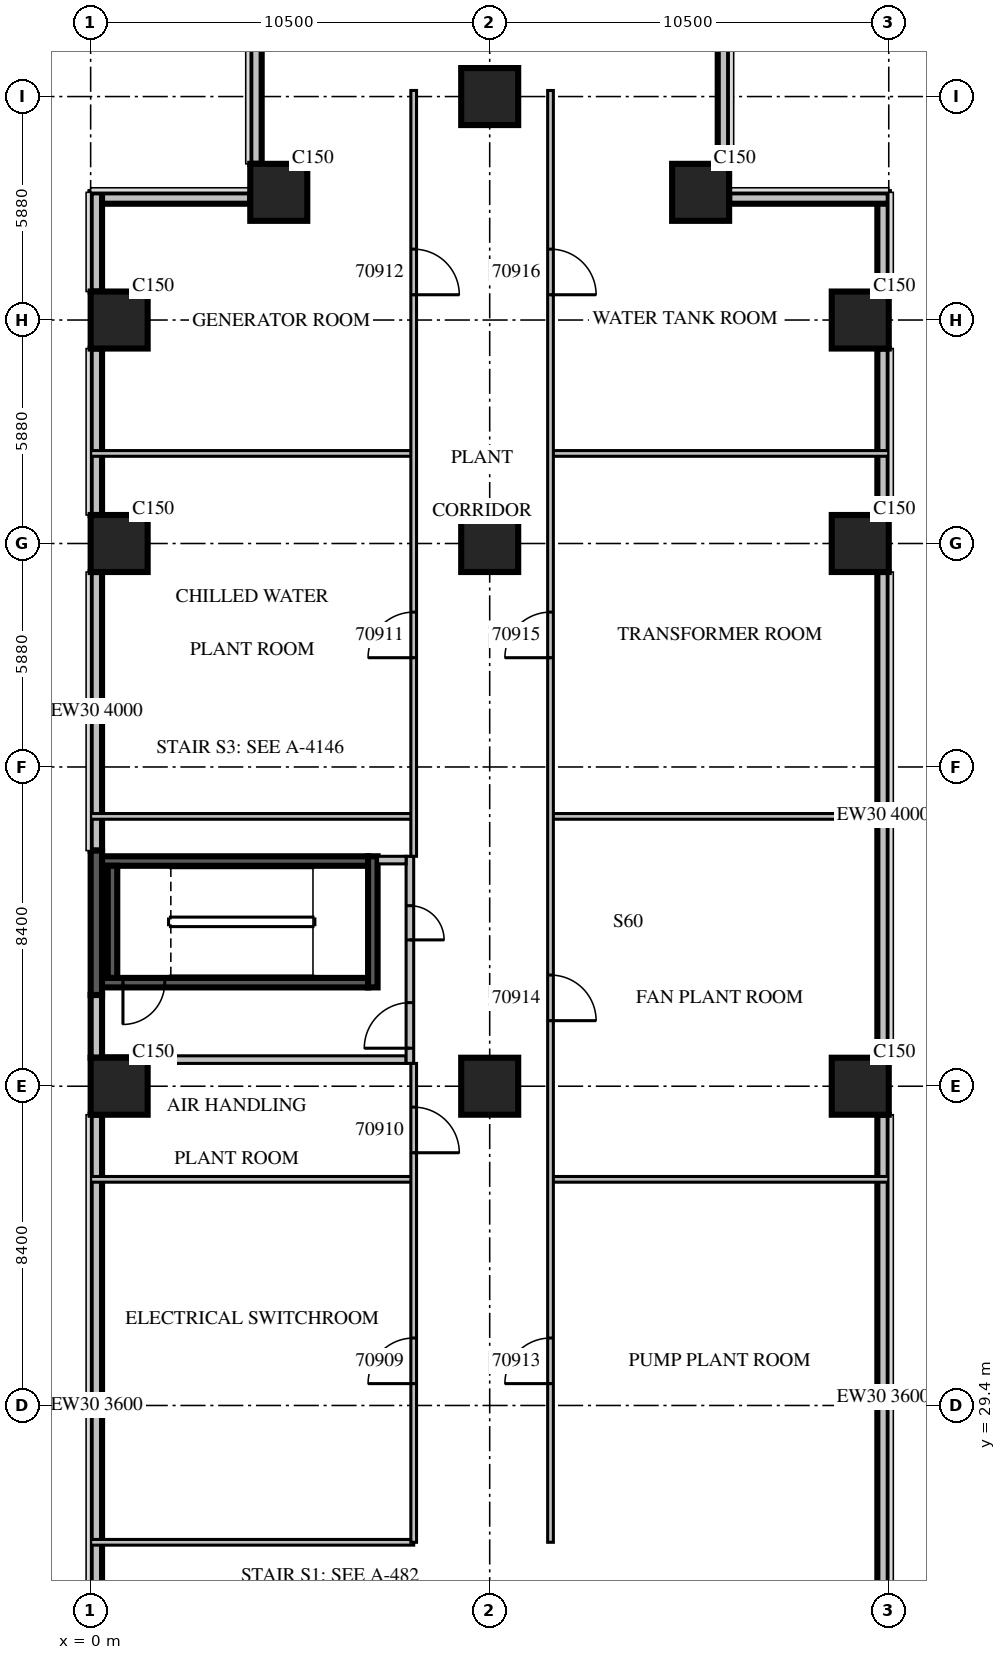
"""IFC4 building model, lengths in metres.
Left out: names, types, materials, properties, quantities, classifications, styles, units other than length and angle.
Written with IfcOpenShell. Run it as: python <this file> out.ifc"""

import sys

from ifc_helpers import new_model, si_unit, direction, frame, frame_2d, origin, origin_2d, place, context, subcontext, project, spatial, rectangle, extrude, source, transform, mapped, element, fill, save


model = new_model("IFC4")
c1 = context("Model", 3, precision=1e-05, world=origin(), true_north=direction((0.0, 1.0)))
c2 = subcontext(c1, "Body", "Model", "MODEL_VIEW")
j1 = project(units=[si_unit("LENGTHUNIT", "METRE"), si_unit("PLANEANGLEUNIT", "RADIAN")], contexts=[c1])
p1 = place(None, origin())
s1 = spatial("IfcSite", under=j1, at=p1, CompositionType="ELEMENT")
p2 = place(p1, origin())
s2 = spatial("IfcBuilding", under=s1, at=p2, CompositionType="ELEMENT")
p3 = place(p2, frame((0.0, 0.0, 34.5)))
s3 = spatial("IfcBuildingStorey", under=s2, at=p3, CompositionType="ELEMENT", Elevation=34.5)
m1 = source(origin(), c2, "Body", "SweptSolid", [
    extrude(rectangle(XDim=1.5, YDim=1.5, at=origin_2d()), origin(), (0.0, 0.0, 1.0), 6.0),
])
for number, where, z_axis, x_axis in (
    (1, (0.75, 37.8, 0.0), (0.0, 0.0, 1.0), (1.0, 0.0, 0.0)),
    (2, (0.75, 52.08, 0.0), (0.0, 0.0, 1.0), (1.0, 0.0, 0.0)),
    (3, (0.75, 57.96, 0.0), (0.0, 0.0, 1.0), (1.0, 0.0, 0.0)),
    (4, (4.95, 61.32, 0.0), (0.0, 0.0, 1.0), (1.0, 0.0, 0.0)),
    (5, (10.5, 37.8, 0.0), (0.0, 0.0, 1.0), (1.0, 0.0, 0.0)),
    (6, (10.5, 52.08, 0.0), (0.0, 0.0, 1.0), (1.0, 0.0, 0.0)),
    (7, (10.5, 63.84, 0.0), (0.0, 0.0, 1.0), (1.0, 0.0, 0.0)),
    (8, (16.05, 61.32, 0.0), (0.0, 0.0, 1.0), (1.0, 0.0, 0.0)),
    (9, (20.25, 37.8, 0.0), (0.0, 0.0, 1.0), (1.0, 0.0, 0.0)),
    (10, (20.25, 52.08, 0.0), (0.0, 0.0, 1.0), (1.0, 0.0, 0.0)),
    (11, (20.25, 57.96, 0.0), (0.0, 0.0, 1.0), (1.0, 0.0, 0.0)),
):
    element("IfcColumn", number, at=place(p3, frame(where, z_axis=z_axis, x_axis=x_axis)), inside=s3, PredefinedType="COLUMN", context=c2, shape_type="MappedRepresentation", body=[
        mapped(m1, transform((0.0, 0.0, 0.0), scale=1.0)),
    ])
m2 = source(origin(), c2, "Body", "SweptSolid", [
    extrude(rectangle(XDim=14.85, YDim=0.3, at=frame_2d((7.425, 0.0))), origin(), (0.0, 0.0, 1.0), 3.6),
])
p4 = place(p3, frame((20.85, 22.2, 0.0), z_axis=(0.0, 0.0, 1.0), x_axis=(0.0, 1.0, 0.0)))
e12 = element("IfcWall", 12, at=p4, inside=s3, PredefinedType="STANDARD", context=c2, shape_type="MappedRepresentation", body=[
    mapped(m2, transform((0.0, 0.0, 0.0), scale=1.0)),
])
m3 = source(origin(), c2, "Body", "SweptSolid", [
    extrude(rectangle(XDim=12.78, YDim=0.3, at=frame_2d((6.39, 0.0))), origin(), (0.0, 0.0, 1.0), 4.0),
])
p5 = place(p3, frame((20.85, 38.55, 0.0), z_axis=(0.0, 0.0, 1.0), x_axis=(0.0, 1.0, 0.0)))
e13 = element("IfcWall", 13, at=p5, inside=s3, PredefinedType="STANDARD", context=c2, shape_type="MappedRepresentation", body=[
    mapped(m3, transform((0.0, 0.0, 0.0), scale=1.0)),
])
p6 = place(p3, frame((20.85, 52.83, 0.0), z_axis=(0.0, 0.0, 1.0), x_axis=(0.0, 1.0, 0.0)))
e14 = element("IfcWall", 14, at=p6, inside=s3, PredefinedType="STANDARD", context=c2, shape_type="SweptSolid", body=[
    extrude(rectangle(XDim=4.38, YDim=0.3, at=frame_2d((2.19, 0.0))), origin(), (0.0, 0.0, 1.0), 5.6),
])
m4 = source(origin(), c2, "Body", "SweptSolid", [
    extrude(rectangle(XDim=2.61, YDim=0.3, at=frame_2d((1.305, 0.0))), origin(), (0.0, 0.0, 1.0), 5.6),
])
p7 = place(p3, frame((20.85, 58.71, 0.0), z_axis=(0.0, 0.0, 1.0), x_axis=(0.0, 1.0, 0.0)))
e15 = element("IfcWall", 15, at=p7, inside=s3, PredefinedType="STANDARD", context=c2, shape_type="MappedRepresentation", body=[
    mapped(m4, transform((0.0, 0.0, 0.0), scale=1.0)),
])
m5 = source(origin(), c2, "Body", "SweptSolid", [
    extrude(rectangle(XDim=4.2, YDim=0.3, at=frame_2d((2.1, 0.0))), origin(), (0.0, 0.0, 1.0), 5.6),
])
p8 = place(p3, frame((21.0, 61.17, 0.0), z_axis=(0.0, 0.0, 1.0), x_axis=(-1.0, 0.0, 0.0)))
e16 = element("IfcWall", 16, at=p8, inside=s3, PredefinedType="STANDARD", context=c2, shape_type="MappedRepresentation", body=[
    mapped(m5, transform((0.0, 0.0, 0.0), scale=1.0)),
])
m6 = source(origin(), c2, "Body", "SweptSolid", [
    extrude(rectangle(XDim=3.45, YDim=0.3, at=frame_2d((1.725, 0.0))), origin(), (0.0, 0.0, 1.0), 5.6),
])
for number, where, z_axis, x_axis in (
    (17, (16.65, 62.07, 0.0), (0.0, 0.0, 1.0), (0.0, 1.0, 0.0)),
    (18, (4.35, 65.52, 0.0), (0.0, 0.0, 1.0), (0.0, -1.0, 0.0)),
):
    element("IfcWall", number, at=place(p3, frame(where, z_axis=z_axis, x_axis=x_axis)), inside=s3, PredefinedType="STANDARD", context=c2, shape_type="MappedRepresentation", body=[
        mapped(m6, transform((0.0, 0.0, 0.0), scale=1.0)),
    ])
p9 = place(p3, frame((4.2, 61.17, 0.0), z_axis=(0.0, 0.0, 1.0), x_axis=(-1.0, 0.0, 0.0)))
e19 = element("IfcWall", 19, at=p9, inside=s3, PredefinedType="STANDARD", context=c2, shape_type="MappedRepresentation", body=[
    mapped(m5, transform((0.0, 0.0, 0.0), scale=1.0)),
])
p10 = place(p3, frame((0.15, 61.32, 0.0), z_axis=(0.0, 0.0, 1.0), x_axis=(0.0, -1.0, 0.0)))
e20 = element("IfcWall", 20, at=p10, inside=s3, PredefinedType="STANDARD", context=c2, shape_type="MappedRepresentation", body=[
    mapped(m4, transform((0.0, 0.0, 0.0), scale=1.0)),
])
m7 = source(origin(), c2, "Body", "SweptSolid", [
    extrude(rectangle(XDim=4.38, YDim=0.3, at=frame_2d((2.19, 0.0))), origin(), (0.0, 0.0, 1.0), 5.6),
])
p11 = place(p3, frame((0.15, 57.21, 0.0), z_axis=(0.0, 0.0, 1.0), x_axis=(0.0, -1.0, 0.0)))
e21 = element("IfcWall", 21, at=p11, inside=s3, PredefinedType="STANDARD", context=c2, shape_type="MappedRepresentation", body=[
    mapped(m7, transform((0.0, 0.0, 0.0), scale=1.0)),
])
m8 = source(origin(), c2, "Body", "SweptSolid", [
    extrude(rectangle(XDim=7.33, YDim=0.3, at=frame_2d((3.665, 0.0))), origin(), (0.0, 0.0, 1.0), 4.0),
])
p12 = place(p3, frame((0.15, 51.33, 0.0), z_axis=(0.0, 0.0, 1.0), x_axis=(0.0, -1.0, 0.0)))
e22 = element("IfcWall", 22, at=p12, inside=s3, PredefinedType="STANDARD", context=c2, shape_type="MappedRepresentation", body=[
    mapped(m8, transform((0.0, 0.0, 0.0), scale=1.0)),
])
m9 = source(origin(), c2, "Body", "SweptSolid", [
    extrude(rectangle(XDim=3.8, YDim=0.3, at=frame_2d((1.9, 0.0))), origin(), (0.0, 0.0, 1.0), 5.6),
])
p13 = place(p3, frame((0.15, 44.0, 0.0), z_axis=(0.0, 0.0, 1.0), x_axis=(0.0, -1.0, 0.0)))
e23 = element("IfcWall", 23, at=p13, inside=s3, PredefinedType="SOLIDWALL", context=c2, shape_type="MappedRepresentation", body=[
    mapped(m9, transform((0.0, 0.0, 0.0), scale=1.0)),
])
m10 = source(origin(), c2, "Body", "SweptSolid", [
    extrude(rectangle(XDim=1.65, YDim=0.3, at=frame_2d((0.825, 0.0))), origin(), (0.0, 0.0, 1.0), 4.0),
])
p14 = place(p3, frame((0.15, 40.2, 0.0), z_axis=(0.0, 0.0, 1.0), x_axis=(0.0, -1.0, 0.0)))
e24 = element("IfcWall", 24, at=p14, inside=s3, PredefinedType="STANDARD", context=c2, shape_type="MappedRepresentation", body=[
    mapped(m10, transform((0.0, 0.0, 0.0), scale=1.0)),
])
m11 = source(origin(), c2, "Body", "SweptSolid", [
    extrude(rectangle(XDim=15.3, YDim=0.3, at=frame_2d((7.65, 0.0))), origin(), (0.0, 0.0, 1.0), 3.6),
])
p15 = place(p3, frame((0.15, 37.05, 0.0), z_axis=(0.0, 0.0, 1.0), x_axis=(0.0, -1.0, 0.0)))
e25 = element("IfcWall", 25, at=p15, inside=s3, PredefinedType="STANDARD", context=c2, shape_type="MappedRepresentation", body=[
    mapped(m11, transform((0.0, 0.0, 0.0), scale=1.0)),
])
m12 = source(origin(), c2, "Body", "SweptSolid", [
    extrude(rectangle(XDim=7.0, YDim=0.25, at=frame_2d((3.5, 0.0))), origin(), (0.0, 0.0, 1.0), 5.6),
])
p16 = place(p3, frame((0.3, 40.525, 0.0), z_axis=(0.0, 0.0, 1.0), x_axis=(1.0, 0.0, 0.0)))
e26 = element("IfcWall", 26, at=p16, inside=s3, PredefinedType="SOLIDWALL", context=c2, shape_type="MappedRepresentation", body=[
    mapped(m12, transform((0.0, 0.0, 0.0), scale=1.0)),
])
m13 = source(origin(), c2, "Body", "SweptSolid", [
    extrude(rectangle(XDim=1.1, YDim=2.1, at=frame_2d((0.55, 1.05))), frame((0.0, 0.135, 0.0), z_axis=(0.0, -1.0, 0.0), x_axis=(1.0, 0.0, 0.0)), (0.0, 0.0, 1.0), 0.27),
])
p17 = place(p16, frame((0.55, 0.0, 0.0)))
e27 = element("IfcOpeningElement", 27, at=p17, cuts=e26, PredefinedType="OPENING", context=c2, shape_type="MappedRepresentation", body=[
    mapped(m13, transform((0.0, 0.0, 0.0), scale=1.0)),
])
p18 = place(p3, frame((0.3, 43.725, 0.0), z_axis=(0.0, 0.0, 1.0), x_axis=(1.0, 0.0, 0.0)))
e28 = element("IfcWall", 28, at=p18, inside=s3, PredefinedType="SOLIDWALL", context=c2, shape_type="MappedRepresentation", body=[
    mapped(m12, transform((0.0, 0.0, 0.0), scale=1.0)),
])
m14 = source(origin(), c2, "Body", "SweptSolid", [
    extrude(rectangle(XDim=3.45, YDim=0.25, at=frame_2d((1.725, 0.0))), origin(), (0.0, 0.0, 1.0), 5.6),
])
p19 = place(p3, frame((7.425, 40.4, 0.0), z_axis=(0.0, 0.0, 1.0), x_axis=(0.0, 1.0, 0.0)))
e29 = element("IfcWall", 29, at=p19, inside=s3, PredefinedType="SOLIDWALL", context=c2, shape_type="MappedRepresentation", body=[
    mapped(m14, transform((0.0, 0.0, 0.0), scale=1.0)),
])
m15 = source(origin(), c2, "Body", "SweptSolid", [
    extrude(rectangle(XDim=2.95, YDim=0.25, at=frame_2d((1.475, 0.0))), origin(), (0.0, 0.0, 1.0), 5.6),
])
p20 = place(p3, frame((0.575, 40.65, 0.0), z_axis=(0.0, 0.0, 1.0), x_axis=(0.0, 1.0, 0.0)))
e30 = element("IfcWall", 30, at=p20, inside=s3, PredefinedType="SOLIDWALL", context=c2, shape_type="MappedRepresentation", body=[
    mapped(m15, transform((0.0, 0.0, 0.0), scale=1.0)),
])
m16 = source(origin(), c2, "Body", "SweptSolid", [
    extrude(rectangle(XDim=8.0, YDim=0.2, at=frame_2d((4.0, 0.0))), origin(), (0.0, 0.0, 1.0), 5.6),
])
p21 = place(p3, frame((0.3, 38.5, 0.0), z_axis=(0.0, 0.0, 1.0), x_axis=(1.0, 0.0, 0.0)))
e31 = element("IfcWall", 31, at=p21, inside=s3, PredefinedType="PARTITIONING", context=c2, shape_type="MappedRepresentation", body=[
    mapped(m16, transform((0.0, 0.0, 0.0), scale=1.0)),
])
m17 = source(origin(), c2, "Body", "SweptSolid", [
    extrude(rectangle(XDim=5.45, YDim=0.2, at=frame_2d((2.725, 0.0))), origin(), (0.0, 0.0, 1.0), 5.6),
])
p22 = place(p3, frame((8.4, 38.4, 0.0), z_axis=(0.0, 0.0, 1.0), x_axis=(0.0, 1.0, 0.0)))
e32 = element("IfcWall", 32, at=p22, inside=s3, PredefinedType="PARTITIONING", context=c2, shape_type="MappedRepresentation", body=[
    mapped(m17, transform((0.0, 0.0, 0.0), scale=1.0)),
])
m18 = source(origin(), c2, "Body", "SweptSolid", [
    extrude(rectangle(XDim=1.2, YDim=2.1, at=frame_2d((0.6, 1.05))), frame((0.0, 0.11, 0.0), z_axis=(0.0, -1.0, 0.0), x_axis=(1.0, 0.0, 0.0)), (0.0, 0.0, 1.0), 0.22),
])
p23 = place(p22, frame((0.4, 0.0, 0.0)))
e33 = element("IfcOpeningElement", 33, at=p23, cuts=e32, PredefinedType="OPENING", context=c2, shape_type="MappedRepresentation", body=[
    mapped(m18, transform((0.0, 0.0, 0.0), scale=1.0)),
])
m19 = source(origin(), c2, "Body", "SweptSolid", [
    extrude(rectangle(XDim=0.9, YDim=2.1, at=frame_2d((0.45, 1.05))), frame((0.0, 0.11, 0.0), z_axis=(0.0, -1.0, 0.0), x_axis=(1.0, 0.0, 0.0)), (0.0, 0.0, 1.0), 0.22),
])
p24 = place(p22, frame((3.25, 0.0, 0.0)))
e34 = element("IfcOpeningElement", 34, at=p24, cuts=e32, PredefinedType="OPENING", context=c2, shape_type="MappedRepresentation", body=[
    mapped(m19, transform((0.0, 0.0, 0.0), scale=1.0)),
])
m20 = source(origin(), c2, "Body", "SweptSolid", [
    extrude(rectangle(XDim=0.75, YDim=0.2, at=frame_2d((0.375, 0.0))), origin(), (0.0, 0.0, 1.0), 5.6),
])
p25 = place(p3, frame((7.55, 43.75, 0.0), z_axis=(0.0, 0.0, 1.0), x_axis=(1.0, 0.0, 0.0)))
e35 = element("IfcWall", 35, at=p25, inside=s3, PredefinedType="PARTITIONING", context=c2, shape_type="MappedRepresentation", body=[
    mapped(m20, transform((0.0, 0.0, 0.0), scale=1.0)),
])
p26 = place(p3, frame((0.0, 25.8, 0.0), z_axis=(0.0, 0.0, 1.0), x_axis=(1.0, 0.0, 0.0)))
e36 = element("IfcWall", 36, at=p26, inside=s3, PredefinedType="PARTITIONING", context=c2, shape_type="SweptSolid", body=[
    extrude(rectangle(XDim=8.5, YDim=0.15, at=frame_2d((4.25, 0.0))), origin(), (0.0, 0.0, 1.0), 5.6),
])
m21 = source(origin(), c2, "Body", "SweptSolid", [
    extrude(rectangle(XDim=8.5, YDim=0.15, at=frame_2d((4.25, 0.0))), origin(), (0.0, 0.0, 1.0), 5.6),
])
p27 = place(p3, frame((0.0, 35.35, 0.0), z_axis=(0.0, 0.0, 1.0), x_axis=(1.0, 0.0, 0.0)))
e37 = element("IfcWall", 37, at=p27, inside=s3, PredefinedType="PARTITIONING", context=c2, shape_type="MappedRepresentation", body=[
    mapped(m21, transform((0.0, 0.0, 0.0), scale=1.0)),
])
p28 = place(p3, frame((12.1, 35.35, 0.0), z_axis=(0.0, 0.0, 1.0), x_axis=(1.0, 0.0, 0.0)))
e38 = element("IfcWall", 38, at=p28, inside=s3, PredefinedType="PARTITIONING", context=c2, shape_type="SweptSolid", body=[
    extrude(rectangle(XDim=8.9, YDim=0.15, at=frame_2d((4.45, 0.0))), origin(), (0.0, 0.0, 1.0), 5.6),
])
p29 = place(p3, frame((0.0, 44.9, 0.0), z_axis=(0.0, 0.0, 1.0), x_axis=(1.0, 0.0, 0.0)))
e39 = element("IfcWall", 39, at=p29, inside=s3, PredefinedType="PARTITIONING", context=c2, shape_type="MappedRepresentation", body=[
    mapped(m21, transform((0.0, 0.0, 0.0), scale=1.0)),
])
m22 = source(origin(), c2, "Body", "SweptSolid", [
    extrude(rectangle(XDim=8.9, YDim=0.15, at=frame_2d((4.45, 0.0))), origin(), (0.0, 0.0, 1.0), 5.6),
])
p30 = place(p3, frame((12.1, 44.9, 0.0), z_axis=(0.0, 0.0, 1.0), x_axis=(1.0, 0.0, 0.0)))
e40 = element("IfcWall", 40, at=p30, inside=s3, PredefinedType="PARTITIONING", context=c2, shape_type="MappedRepresentation", body=[
    mapped(m22, transform((0.0, 0.0, 0.0), scale=1.0)),
])
p31 = place(p3, frame((0.0, 54.45, 0.0), z_axis=(0.0, 0.0, 1.0), x_axis=(1.0, 0.0, 0.0)))
e41 = element("IfcWall", 41, at=p31, inside=s3, PredefinedType="PARTITIONING", context=c2, shape_type="MappedRepresentation", body=[
    mapped(m21, transform((0.0, 0.0, 0.0), scale=1.0)),
])
p32 = place(p3, frame((12.1, 54.45, 0.0), z_axis=(0.0, 0.0, 1.0), x_axis=(1.0, 0.0, 0.0)))
e42 = element("IfcWall", 42, at=p32, inside=s3, PredefinedType="PARTITIONING", context=c2, shape_type="MappedRepresentation", body=[
    mapped(m22, transform((0.0, 0.0, 0.0), scale=1.0)),
])
p33 = place(p3, frame((8.5, 25.8, 0.0), z_axis=(0.0, 0.0, 1.0), x_axis=(0.0, 1.0, 0.0)))
e43 = element("IfcWall", 43, at=p33, inside=s3, PredefinedType="PARTITIONING", context=c2, shape_type="SweptSolid", body=[
    extrude(rectangle(XDim=12.6, YDim=0.15, at=frame_2d((6.3, 0.0))), origin(), (0.0, 0.0, 1.0), 5.6),
])
m23 = source(origin(), c2, "Body", "SweptSolid", [
    extrude(rectangle(XDim=1.2, YDim=2.1, at=frame_2d((0.6, 1.05))), frame((0.0, 0.085, 0.0), z_axis=(0.0, -1.0, 0.0), x_axis=(1.0, 0.0, 0.0)), (0.0, 0.0, 1.0), 0.17),
])
p34 = place(p33, frame((4.175, 0.0, 0.0)))
e44 = element("IfcOpeningElement", 44, at=p34, cuts=e43, PredefinedType="OPENING", context=c2, shape_type="MappedRepresentation", body=[
    mapped(m23, transform((0.0, 0.0, 0.0), scale=1.0)),
])
p35 = place(p33, frame((10.25, 0.0, 0.0)))
e45 = element("IfcOpeningElement", 45, at=p35, cuts=e43, PredefinedType="OPENING", context=c2, shape_type="MappedRepresentation", body=[
    mapped(m23, transform((0.0, 0.0, 0.0), scale=1.0)),
])
p36 = place(p3, frame((8.5, 43.85, 0.0), z_axis=(0.0, 0.0, 1.0), x_axis=(0.0, 1.0, 0.0)))
e46 = element("IfcWall", 46, at=p36, inside=s3, PredefinedType="PARTITIONING", context=c2, shape_type="SweptSolid", body=[
    extrude(rectangle(XDim=20.15, YDim=0.15, at=frame_2d((10.075, 0.0))), origin(), (0.0, 0.0, 1.0), 5.6),
])
p37 = place(p36, frame((5.225, 0.0, 0.0)))
e47 = element("IfcOpeningElement", 47, at=p37, cuts=e46, PredefinedType="OPENING", context=c2, shape_type="MappedRepresentation", body=[
    mapped(m23, transform((0.0, 0.0, 0.0), scale=1.0)),
])
p38 = place(p36, frame((14.775, 0.0, 0.0)))
e48 = element("IfcOpeningElement", 48, at=p38, cuts=e46, PredefinedType="OPENING", context=c2, shape_type="MappedRepresentation", body=[
    mapped(m23, transform((0.0, 0.0, 0.0), scale=1.0)),
])
p39 = place(p3, frame((12.1, 25.8, 0.0), z_axis=(0.0, 0.0, 1.0), x_axis=(0.0, 1.0, 0.0)))
e49 = element("IfcWall", 49, at=p39, inside=s3, PredefinedType="PARTITIONING", context=c2, shape_type="SweptSolid", body=[
    extrude(rectangle(XDim=38.2, YDim=0.15, at=frame_2d((19.1, 0.0))), origin(), (0.0, 0.0, 1.0), 5.6),
])
p40 = place(p39, frame((4.175, 0.0, 0.0)))
e50 = element("IfcOpeningElement", 50, at=p40, cuts=e49, PredefinedType="OPENING", context=c2, shape_type="MappedRepresentation", body=[
    mapped(m23, transform((0.0, 0.0, 0.0), scale=1.0)),
])
p41 = place(p39, frame((13.725, 0.0, 0.0)))
e51 = element("IfcOpeningElement", 51, at=p41, cuts=e49, PredefinedType="OPENING", context=c2, shape_type="MappedRepresentation", body=[
    mapped(m23, transform((0.0, 0.0, 0.0), scale=1.0)),
])
p42 = place(p39, frame((23.275, 0.0, 0.0)))
e52 = element("IfcOpeningElement", 52, at=p42, cuts=e49, PredefinedType="OPENING", context=c2, shape_type="MappedRepresentation", body=[
    mapped(m23, transform((0.0, 0.0, 0.0), scale=1.0)),
])
p43 = place(p39, frame((32.825, 0.0, 0.0)))
e53 = element("IfcOpeningElement", 53, at=p43, cuts=e49, PredefinedType="OPENING", context=c2, shape_type="MappedRepresentation", body=[
    mapped(m23, transform((0.0, 0.0, 0.0), scale=1.0)),
])
m24 = source(origin(), c2, "Body", "SweptSolid", [
    extrude(rectangle(XDim=1.1, YDim=2.1, at=frame_2d((0.55, 1.05))), frame((0.0, 0.025, 0.0), z_axis=(0.0, -1.0, 0.0), x_axis=(1.0, 0.0, 0.0)), (0.0, 0.0, 1.0), 0.05),
])
p44 = place(p17, origin())
e54 = element("IfcDoor", 54, at=p44, inside=s3, OperationType="SINGLE_SWING_RIGHT", PredefinedType="DOOR", context=c2, shape_type="MappedRepresentation", body=[
    mapped(m24, transform((0.0, 0.0, 0.0), scale=1.0)),
])
fill(e27, e54)
m25 = source(origin(), c2, "Body", "SweptSolid", [
    extrude(rectangle(XDim=1.2, YDim=2.1, at=frame_2d((0.6, 1.05))), frame((0.0, 0.025, 0.0), z_axis=(0.0, -1.0, 0.0), x_axis=(1.0, 0.0, 0.0)), (0.0, 0.0, 1.0), 0.05),
])
p45 = place(p23, origin())
e55 = element("IfcDoor", 55, at=p45, inside=s3, OperationType="SINGLE_SWING_LEFT", PredefinedType="DOOR", context=c2, shape_type="MappedRepresentation", body=[
    mapped(m25, transform((0.0, 0.0, 0.0), scale=1.0)),
])
fill(e33, e55)
m26 = source(origin(), c2, "Body", "SweptSolid", [
    extrude(rectangle(XDim=0.9, YDim=2.1, at=frame_2d((0.45, 1.05))), frame((0.0, 0.025, 0.0), z_axis=(0.0, -1.0, 0.0), x_axis=(1.0, 0.0, 0.0)), (0.0, 0.0, 1.0), 0.05),
])
p46 = place(p24, origin())
e56 = element("IfcDoor", 56, at=p46, inside=s3, OperationType="SINGLE_SWING_RIGHT", PredefinedType="DOOR", context=c2, shape_type="MappedRepresentation", body=[
    mapped(m26, transform((0.0, 0.0, 0.0), scale=1.0)),
])
fill(e34, e56)
p47 = place(p34, origin())
e57 = element("IfcDoor", 57, at=p47, inside=s3, OperationType="SINGLE_SWING_LEFT", PredefinedType="DOOR", context=c2, shape_type="MappedRepresentation", body=[
    mapped(m25, transform((0.0, 0.0, 0.0), scale=1.0)),
])
fill(e44, e57)
p48 = place(p35, origin())
e58 = element("IfcDoor", 58, at=p48, inside=s3, OperationType="SINGLE_SWING_RIGHT", PredefinedType="DOOR", context=c2, shape_type="MappedRepresentation", body=[
    mapped(m25, transform((0.0, 0.0, 0.0), scale=1.0)),
])
fill(e45, e58)
p49 = place(p37, origin())
e59 = element("IfcDoor", 59, at=p49, inside=s3, OperationType="SINGLE_SWING_LEFT", PredefinedType="DOOR", context=c2, shape_type="MappedRepresentation", body=[
    mapped(m25, transform((0.0, 0.0, 0.0), scale=1.0)),
])
fill(e47, e59)
p50 = place(p38, origin())
e60 = element("IfcDoor", 60, at=p50, inside=s3, OperationType="SINGLE_SWING_RIGHT", PredefinedType="DOOR", context=c2, shape_type="MappedRepresentation", body=[
    mapped(m25, transform((0.0, 0.0, 0.0), scale=1.0)),
])
fill(e48, e60)
p51 = place(p40, origin())
e61 = element("IfcDoor", 61, at=p51, inside=s3, OperationType="SINGLE_SWING_LEFT", PredefinedType="DOOR", context=c2, shape_type="MappedRepresentation", body=[
    mapped(m25, transform((0.0, 0.0, 0.0), scale=1.0)),
])
fill(e50, e61)
p52 = place(p41, origin())
e62 = element("IfcDoor", 62, at=p52, inside=s3, OperationType="SINGLE_SWING_RIGHT", PredefinedType="DOOR", context=c2, shape_type="MappedRepresentation", body=[
    mapped(m25, transform((0.0, 0.0, 0.0), scale=1.0)),
])
fill(e51, e62)
p53 = place(p42, origin())
e63 = element("IfcDoor", 63, at=p53, inside=s3, OperationType="SINGLE_SWING_LEFT", PredefinedType="DOOR", context=c2, shape_type="MappedRepresentation", body=[
    mapped(m25, transform((0.0, 0.0, 0.0), scale=1.0)),
])
fill(e52, e63)
p54 = place(p43, origin())
e64 = element("IfcDoor", 64, at=p54, inside=s3, OperationType="SINGLE_SWING_RIGHT", PredefinedType="DOOR", context=c2, shape_type="MappedRepresentation", body=[
    mapped(m25, transform((0.0, 0.0, 0.0), scale=1.0)),
])
fill(e53, e64)
save(model, sys.argv[1])
